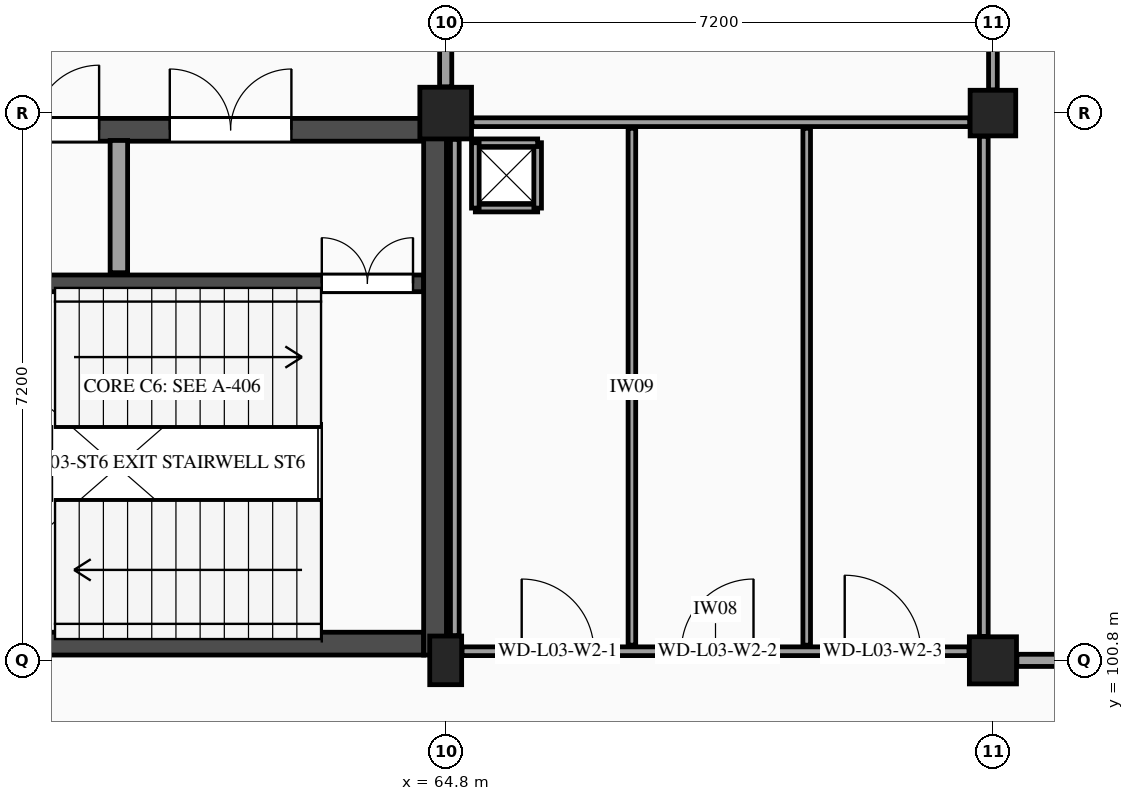
"""IFC4 building model, lengths in metres.
Left out: names, types, materials, properties, quantities, classifications, styles, units other than length and angle.
Written with IfcOpenShell. Run it as: python <this file> out.ifc"""

import sys

from ifc_helpers import new_model, si_unit, direction, frame, frame_2d, origin, origin_2d, place, context, subcontext, project, spatial, rectangle, extrude, element, fill, save


model = new_model("IFC4")
c1 = context("Model", 3, precision=1e-05, world=origin(), true_north=direction((0.0, 1.0)))
c2 = subcontext(c1, "Body", "Model", "MODEL_VIEW")
j1 = project(units=[si_unit("LENGTHUNIT", "METRE"), si_unit("PLANEANGLEUNIT", "RADIAN")], contexts=[c1])
p1 = place(None, origin())
s1 = spatial("IfcSite", under=j1, at=p1, CompositionType="ELEMENT")
p2 = place(p1, origin())
s2 = spatial("IfcBuilding", under=s1, at=p2, CompositionType="ELEMENT")
p3 = place(p2, frame((0.0, 0.0, 14.4)))
s3 = spatial("IfcBuildingStorey", under=s2, at=p3, CompositionType="ELEMENT", Elevation=14.4)
p4 = place(p3, frame((64.8, 100.8, 0.0), z_axis=(0.0, 0.0, 1.0), x_axis=(1.0, 0.0, 0.0)))
e1 = element("IfcColumn", 1, at=p4, inside=s3, PredefinedType="PILASTER", context=c2, shape_type="SweptSolid", body=[
    extrude(rectangle(XDim=0.42, YDim=0.64, at=origin_2d()), origin(), (0.0, 0.0, 1.0), 4.2),
])
p5 = place(p3, frame((64.8, 108.0, 0.0), z_axis=(0.0, 0.0, 1.0), x_axis=(1.0, 0.0, 0.0)))
e2 = element("IfcColumn", 2, at=p5, inside=s3, PredefinedType="COLUMN", context=c2, shape_type="SweptSolid", body=[
    extrude(rectangle(XDim=0.68, YDim=0.68, at=origin_2d()), origin(), (0.0, 0.0, 1.0), 4.2),
])
p6 = place(p3, frame((72.0, 100.8, 0.0), z_axis=(0.0, 0.0, 1.0), x_axis=(1.0, 0.0, 0.0)))
e3 = element("IfcColumn", 3, at=p6, inside=s3, PredefinedType="COLUMN", context=c2, shape_type="SweptSolid", body=[
    extrude(rectangle(XDim=0.62, YDim=0.62, at=origin_2d()), origin(), (0.0, 0.0, 1.0), 4.2),
])
p7 = place(p3, frame((72.0, 108.0, 0.0), z_axis=(0.0, 0.0, 1.0), x_axis=(1.0, 0.0, 0.0)))
e4 = element("IfcColumn", 4, at=p7, inside=s3, PredefinedType="COLUMN", context=c2, shape_type="SweptSolid", body=[
    extrude(rectangle(XDim=0.6, YDim=0.6, at=origin_2d()), origin(), (0.0, 0.0, 1.0), 4.2),
])
p8 = place(p3, frame((57.97, 101.02, 0.0), z_axis=(0.0, 0.0, 1.0), x_axis=(1.0, 0.0, 0.0)))
e5 = element("IfcWall", 5, at=p8, inside=s3, PredefinedType="SHEAR", context=c2, shape_type="SweptSolid", body=[
    extrude(rectangle(XDim=6.54, YDim=0.3, at=frame_2d((3.27, 0.0))), origin(), (0.0, 0.0, 1.0), 3.94),
])
p9 = place(p3, frame((57.97, 107.78, 0.0), z_axis=(0.0, 0.0, 1.0), x_axis=(1.0, 0.0, 0.0)))
e6 = element("IfcWall", 6, at=p9, inside=s3, PredefinedType="SHEAR", context=c2, shape_type="SweptSolid", body=[
    extrude(rectangle(XDim=6.54, YDim=0.3, at=frame_2d((3.27, 0.0))), origin(), (0.0, 0.0, 1.0), 3.94),
])
p10 = place(p9, frame((1.42, 0.0, 0.0)))
e7 = element("IfcOpeningElement", 7, at=p10, cuts=e6, PredefinedType="OPENING", context=c2, shape_type="SweptSolid", body=[
    extrude(rectangle(XDim=0.85, YDim=2.1, at=frame_2d((0.425, 1.05))), frame((0.0, 0.16, 0.0), z_axis=(0.0, -1.0, 0.0), x_axis=(1.0, 0.0, 0.0)), (0.0, 0.0, 1.0), 0.32),
])
p11 = place(p9, frame((3.2, 0.0, 0.0)))
e8 = element("IfcOpeningElement", 8, at=p11, cuts=e6, PredefinedType="OPENING", context=c2, shape_type="SweptSolid", body=[
    extrude(rectangle(XDim=1.6, YDim=2.2, at=frame_2d((0.8, 1.1))), frame((0.0, 0.16, 0.0), z_axis=(0.0, -1.0, 0.0), x_axis=(1.0, 0.0, 0.0)), (0.0, 0.0, 1.0), 0.32),
])
p12 = place(p3, frame((57.97, 105.76, 0.0), z_axis=(0.0, 0.0, 1.0), x_axis=(1.0, 0.0, 0.0)))
e9 = element("IfcWall", 9, at=p12, inside=s3, PredefinedType="SHEAR", context=c2, shape_type="SweptSolid", body=[
    extrude(rectangle(XDim=6.54, YDim=0.22, at=frame_2d((3.27, 0.0))), origin(), (0.0, 0.0, 1.0), 3.94),
])
p13 = place(p12, frame((5.2, 0.0, 0.0)))
e10 = element("IfcOpeningElement", 10, at=p13, cuts=e9, PredefinedType="OPENING", context=c2, shape_type="SweptSolid", body=[
    extrude(rectangle(XDim=1.2, YDim=2.2, at=frame_2d((0.6, 1.1))), frame((0.0, 0.12, 0.0), z_axis=(0.0, -1.0, 0.0), x_axis=(1.0, 0.0, 0.0)), (0.0, 0.0, 1.0), 0.24),
])
p14 = place(p3, frame((60.5, 105.9, 0.0), z_axis=(0.0, 0.0, 1.0), x_axis=(0.0, 1.0, 0.0)))
e11 = element("IfcWall", 11, at=p14, inside=s3, PredefinedType="PARTITIONING", context=c2, shape_type="SweptSolid", body=[
    extrude(rectangle(XDim=1.74, YDim=0.23, at=frame_2d((0.87, 0.0))), origin(), (0.0, 0.0, 1.0), 3.94),
])
p15 = place(p3, frame((64.66, 100.87, 0.0), z_axis=(0.0, 0.0, 1.0), x_axis=(0.0, 1.0, 0.0)))
e12 = element("IfcWall", 12, at=p15, inside=s3, PredefinedType="SHEAR", context=c2, shape_type="SweptSolid", body=[
    extrude(rectangle(XDim=7.06, YDim=0.3, at=frame_2d((3.53, 0.0))), origin(), (0.0, 0.0, 1.0), 3.94),
])
p16 = place(p3, frame((65.015, 100.92, 0.0), z_axis=(0.0, 0.0, 1.0), x_axis=(1.0, 0.0, 0.0)))
e13 = element("IfcWall", 13, at=p16, inside=s3, PredefinedType="PARTITIONING", context=c2, shape_type="SweptSolid", body=[
    extrude(rectangle(XDim=6.67, YDim=0.115, at=frame_2d((3.335, 0.0))), origin(), (0.0, 0.0, 1.0), 3.2),
])
p17 = place(p16, frame((0.785, 0.0, 0.0)))
e14 = element("IfcOpeningElement", 14, at=p17, cuts=e13, PredefinedType="OPENING", context=c2, shape_type="SweptSolid", body=[
    extrude(rectangle(XDim=0.95, YDim=2.1, at=frame_2d((0.475, 1.05))), frame((0.0, 0.067, 0.0), z_axis=(0.0, -1.0, 0.0), x_axis=(1.0, 0.0, 0.0)), (0.0, 0.0, 1.0), 0.135),
])
p18 = place(p16, frame((2.885, 0.0, 0.0)))
e15 = element("IfcOpeningElement", 15, at=p18, cuts=e13, PredefinedType="OPENING", context=c2, shape_type="SweptSolid", body=[
    extrude(rectangle(XDim=0.95, YDim=2.1, at=frame_2d((0.475, 1.05))), frame((0.0, 0.067, 0.0), z_axis=(0.0, -1.0, 0.0), x_axis=(1.0, 0.0, 0.0)), (0.0, 0.0, 1.0), 0.135),
])
p19 = place(p16, frame((5.035, 0.0, 0.0)))
e16 = element("IfcOpeningElement", 16, at=p19, cuts=e13, PredefinedType="OPENING", context=c2, shape_type="SweptSolid", body=[
    extrude(rectangle(XDim=1.0, YDim=2.15, at=frame_2d((0.5, 1.075))), frame((0.0, 0.067, 0.0), z_axis=(0.0, -1.0, 0.0), x_axis=(1.0, 0.0, 0.0)), (0.0, 0.0, 1.0), 0.135),
])
p20 = place(p3, frame((65.145, 107.88, 0.0), z_axis=(0.0, 0.0, 1.0), x_axis=(1.0, 0.0, 0.0)))
e17 = element("IfcWall", 17, at=p20, inside=s3, PredefinedType="PARTITIONING", context=c2, shape_type="SweptSolid", body=[
    extrude(rectangle(XDim=6.55, YDim=0.115, at=frame_2d((3.275, 0.0))), origin(), (0.0, 0.0, 1.0), 3.2),
])
p21 = place(p3, frame((64.92, 101.125, 0.0), z_axis=(0.0, 0.0, 1.0), x_axis=(0.0, 1.0, 0.0)))
e18 = element("IfcWall", 18, at=p21, inside=s3, PredefinedType="PARTITIONING", context=c2, shape_type="SweptSolid", body=[
    extrude(rectangle(XDim=6.53, YDim=0.115, at=frame_2d((3.265, 0.0))), origin(), (0.0, 0.0, 1.0), 3.25),
])
p22 = place(p3, frame((71.88, 101.115, 0.0), z_axis=(0.0, 0.0, 1.0), x_axis=(0.0, 1.0, 0.0)))
e19 = element("IfcWall", 19, at=p22, inside=s3, PredefinedType="PARTITIONING", context=c2, shape_type="SweptSolid", body=[
    extrude(rectangle(XDim=6.58, YDim=0.115, at=frame_2d((3.29, 0.0))), origin(), (0.0, 0.0, 1.0), 3.25),
])
for number, where, z_axis, x_axis in (
    (20, (67.25, 101.0, 0.0), (0.0, 0.0, 1.0), (0.0, 1.0, 0.0)),
    (21, (69.55, 101.0, 0.0), (0.0, 0.0, 1.0), (0.0, 1.0, 0.0)),
):
    element("IfcWall", number, at=place(p3, frame(where, z_axis=z_axis, x_axis=x_axis)), inside=s3, PredefinedType="PARTITIONING", context=c2, shape_type="SweptSolid", body=[
        extrude(rectangle(XDim=6.8, YDim=0.1, at=frame_2d((3.4, 0.0))), origin(), (0.0, 0.0, 1.0), 3.94),
    ])
p23 = place(p3, frame((65.19, 106.75, 0.0), z_axis=(0.0, 0.0, 1.0), x_axis=(1.0, 0.0, 0.0)))
e22 = element("IfcWall", 22, at=p23, inside=s3, PredefinedType="PARTITIONING", context=c2, shape_type="SweptSolid", body=[
    extrude(rectangle(XDim=0.82, YDim=0.1, at=frame_2d((0.41, 0.0))), origin(), (0.0, 0.0, 1.0), 3.94),
])
p24 = place(p3, frame((66.01, 106.75, 0.0), z_axis=(0.0, 0.0, 1.0), x_axis=(0.0, 1.0, 0.0)))
e23 = element("IfcWall", 23, at=p24, inside=s3, PredefinedType="PARTITIONING", context=c2, shape_type="SweptSolid", body=[
    extrude(rectangle(XDim=0.86, YDim=0.1, at=frame_2d((0.43, 0.0))), origin(), (0.0, 0.0, 1.0), 3.94),
])
p25 = place(p3, frame((66.01, 107.61, 0.0), z_axis=(0.0, 0.0, 1.0), x_axis=(-1.0, 0.0, 0.0)))
e24 = element("IfcWall", 24, at=p25, inside=s3, PredefinedType="PARTITIONING", context=c2, shape_type="SweptSolid", body=[
    extrude(rectangle(XDim=0.82, YDim=0.1, at=frame_2d((0.41, 0.0))), origin(), (0.0, 0.0, 1.0), 3.94),
])
p26 = place(p3, frame((65.19, 107.61, 0.0), z_axis=(0.0, 0.0, 1.0), x_axis=(0.0, -1.0, 0.0)))
e25 = element("IfcWall", 25, at=p26, inside=s3, PredefinedType="PARTITIONING", context=c2, shape_type="SweptSolid", body=[
    extrude(rectangle(XDim=0.86, YDim=0.1, at=frame_2d((0.43, 0.0))), origin(), (0.0, 0.0, 1.0), 3.94),
])
p27 = place(p3, frame((64.8, 108.345, 0.0), z_axis=(0.0, 0.0, 1.0), x_axis=(0.0, 1.0, 0.0)))
e26 = element("IfcWall", 26, at=p27, inside=s3, PredefinedType="PARTITIONING", context=c2, shape_type="SweptSolid", body=[
    extrude(rectangle(XDim=6.525, YDim=0.16, at=frame_2d((3.263, 0.0))), origin(), (0.0, 0.0, 1.0), 3.245),
])
p28 = place(p27, frame((2.462, 0.0, 0.0)))
e27 = element("IfcOpeningElement", 27, at=p28, cuts=e26, PredefinedType="OPENING", context=c2, shape_type="SweptSolid", body=[
    extrude(rectangle(XDim=1.6, YDim=2.2, at=frame_2d((0.8, 1.1))), frame((0.0, 0.09, 0.0), z_axis=(0.0, -1.0, 0.0), x_axis=(1.0, 0.0, 0.0)), (0.0, 0.0, 1.0), 0.18),
])
p29 = place(p3, frame((72.0, 108.305, 0.0), z_axis=(0.0, 0.0, 1.0), x_axis=(0.0, 1.0, 0.0)))
e28 = element("IfcWall", 28, at=p29, inside=s3, PredefinedType="PARTITIONING", context=c2, shape_type="SweptSolid", body=[
    extrude(rectangle(XDim=6.515, YDim=0.115, at=frame_2d((3.258, 0.0))), origin(), (0.0, 0.0, 1.0), 3.245),
])
p30 = place(p3, frame((72.315, 100.8, 0.0), z_axis=(0.0, 0.0, 1.0), x_axis=(1.0, 0.0, 0.0)))
e29 = element("IfcWall", 29, at=p30, inside=s3, PredefinedType="PARTITIONING", context=c2, shape_type="SweptSolid", body=[
    extrude(rectangle(XDim=6.67, YDim=0.16, at=frame_2d((3.335, 0.0))), origin(), (0.0, 0.0, 1.0), 3.215),
])
p31 = place(p30, frame((2.535, 0.0, 0.0)))
e30 = element("IfcOpeningElement", 30, at=p31, cuts=e29, PredefinedType="OPENING", context=c2, shape_type="SweptSolid", body=[
    extrude(rectangle(XDim=1.6, YDim=2.2, at=frame_2d((0.8, 1.1))), frame((0.0, 0.09, 0.0), z_axis=(0.0, -1.0, 0.0), x_axis=(1.0, 0.0, 0.0)), (0.0, 0.0, 1.0), 0.18),
])
p32 = place(p10, origin())
e31 = element("IfcDoor", 31, at=p32, inside=s3, OperationType="SINGLE_SWING_RIGHT", PredefinedType="DOOR", context=c2, shape_type="SweptSolid", body=[
    extrude(rectangle(XDim=0.85, YDim=2.1, at=frame_2d((0.425, 1.05))), frame((0.0, 0.025, 0.0), z_axis=(0.0, -1.0, 0.0), x_axis=(1.0, 0.0, 0.0)), (0.0, 0.0, 1.0), 0.05),
])
fill(e7, e31)
p33 = place(p13, origin())
e32 = element("IfcDoor", 32, at=p33, inside=s3, OperationType="DOUBLE_DOOR_SINGLE_SWING", PredefinedType="DOOR", context=c2, shape_type="SweptSolid", body=[
    extrude(rectangle(XDim=1.2, YDim=2.2, at=frame_2d((0.6, 1.1))), frame((0.0, 0.025, 0.0), z_axis=(0.0, -1.0, 0.0), x_axis=(1.0, 0.0, 0.0)), (0.0, 0.0, 1.0), 0.05),
])
fill(e10, e32)
p34 = place(p11, frame((1.6, 0.0, 0.0), z_axis=(0.0, 0.0, 1.0), x_axis=(-1.0, 0.0, 0.0)))
e33 = element("IfcDoor", 33, at=p34, inside=s3, OperationType="DOUBLE_DOOR_SINGLE_SWING", PredefinedType="DOOR", context=c2, shape_type="SweptSolid", body=[
    extrude(rectangle(XDim=1.6, YDim=2.2, at=frame_2d((0.8, 1.1))), frame((0.0, 0.025, 0.0), z_axis=(0.0, -1.0, 0.0), x_axis=(1.0, 0.0, 0.0)), (0.0, 0.0, 1.0), 0.05),
])
fill(e8, e33)
p35 = place(p17, origin())
e34 = element("IfcDoor", 34, at=p35, inside=s3, OperationType="SINGLE_SWING_LEFT", PredefinedType="DOOR", context=c2, shape_type="SweptSolid", body=[
    extrude(rectangle(XDim=0.95, YDim=2.1, at=frame_2d((0.475, 1.05))), frame((0.0, 0.025, 0.0), z_axis=(0.0, -1.0, 0.0), x_axis=(1.0, 0.0, 0.0)), (0.0, 0.0, 1.0), 0.05),
])
fill(e14, e34)
p36 = place(p18, origin())
e35 = element("IfcDoor", 35, at=p36, inside=s3, OperationType="SINGLE_SWING_RIGHT", PredefinedType="DOOR", context=c2, shape_type="SweptSolid", body=[
    extrude(rectangle(XDim=0.95, YDim=2.1, at=frame_2d((0.475, 1.05))), frame((0.0, 0.025, 0.0), z_axis=(0.0, -1.0, 0.0), x_axis=(1.0, 0.0, 0.0)), (0.0, 0.0, 1.0), 0.05),
])
fill(e15, e35)
p37 = place(p19, origin())
e36 = element("IfcDoor", 36, at=p37, inside=s3, OperationType="SINGLE_SWING_LEFT", PredefinedType="DOOR", context=c2, shape_type="SweptSolid", body=[
    extrude(rectangle(XDim=1.0, YDim=2.15, at=frame_2d((0.5, 1.075))), frame((0.0, 0.025, 0.0), z_axis=(0.0, -1.0, 0.0), x_axis=(1.0, 0.0, 0.0)), (0.0, 0.0, 1.0), 0.05),
])
fill(e16, e36)
save(model, sys.argv[1])
